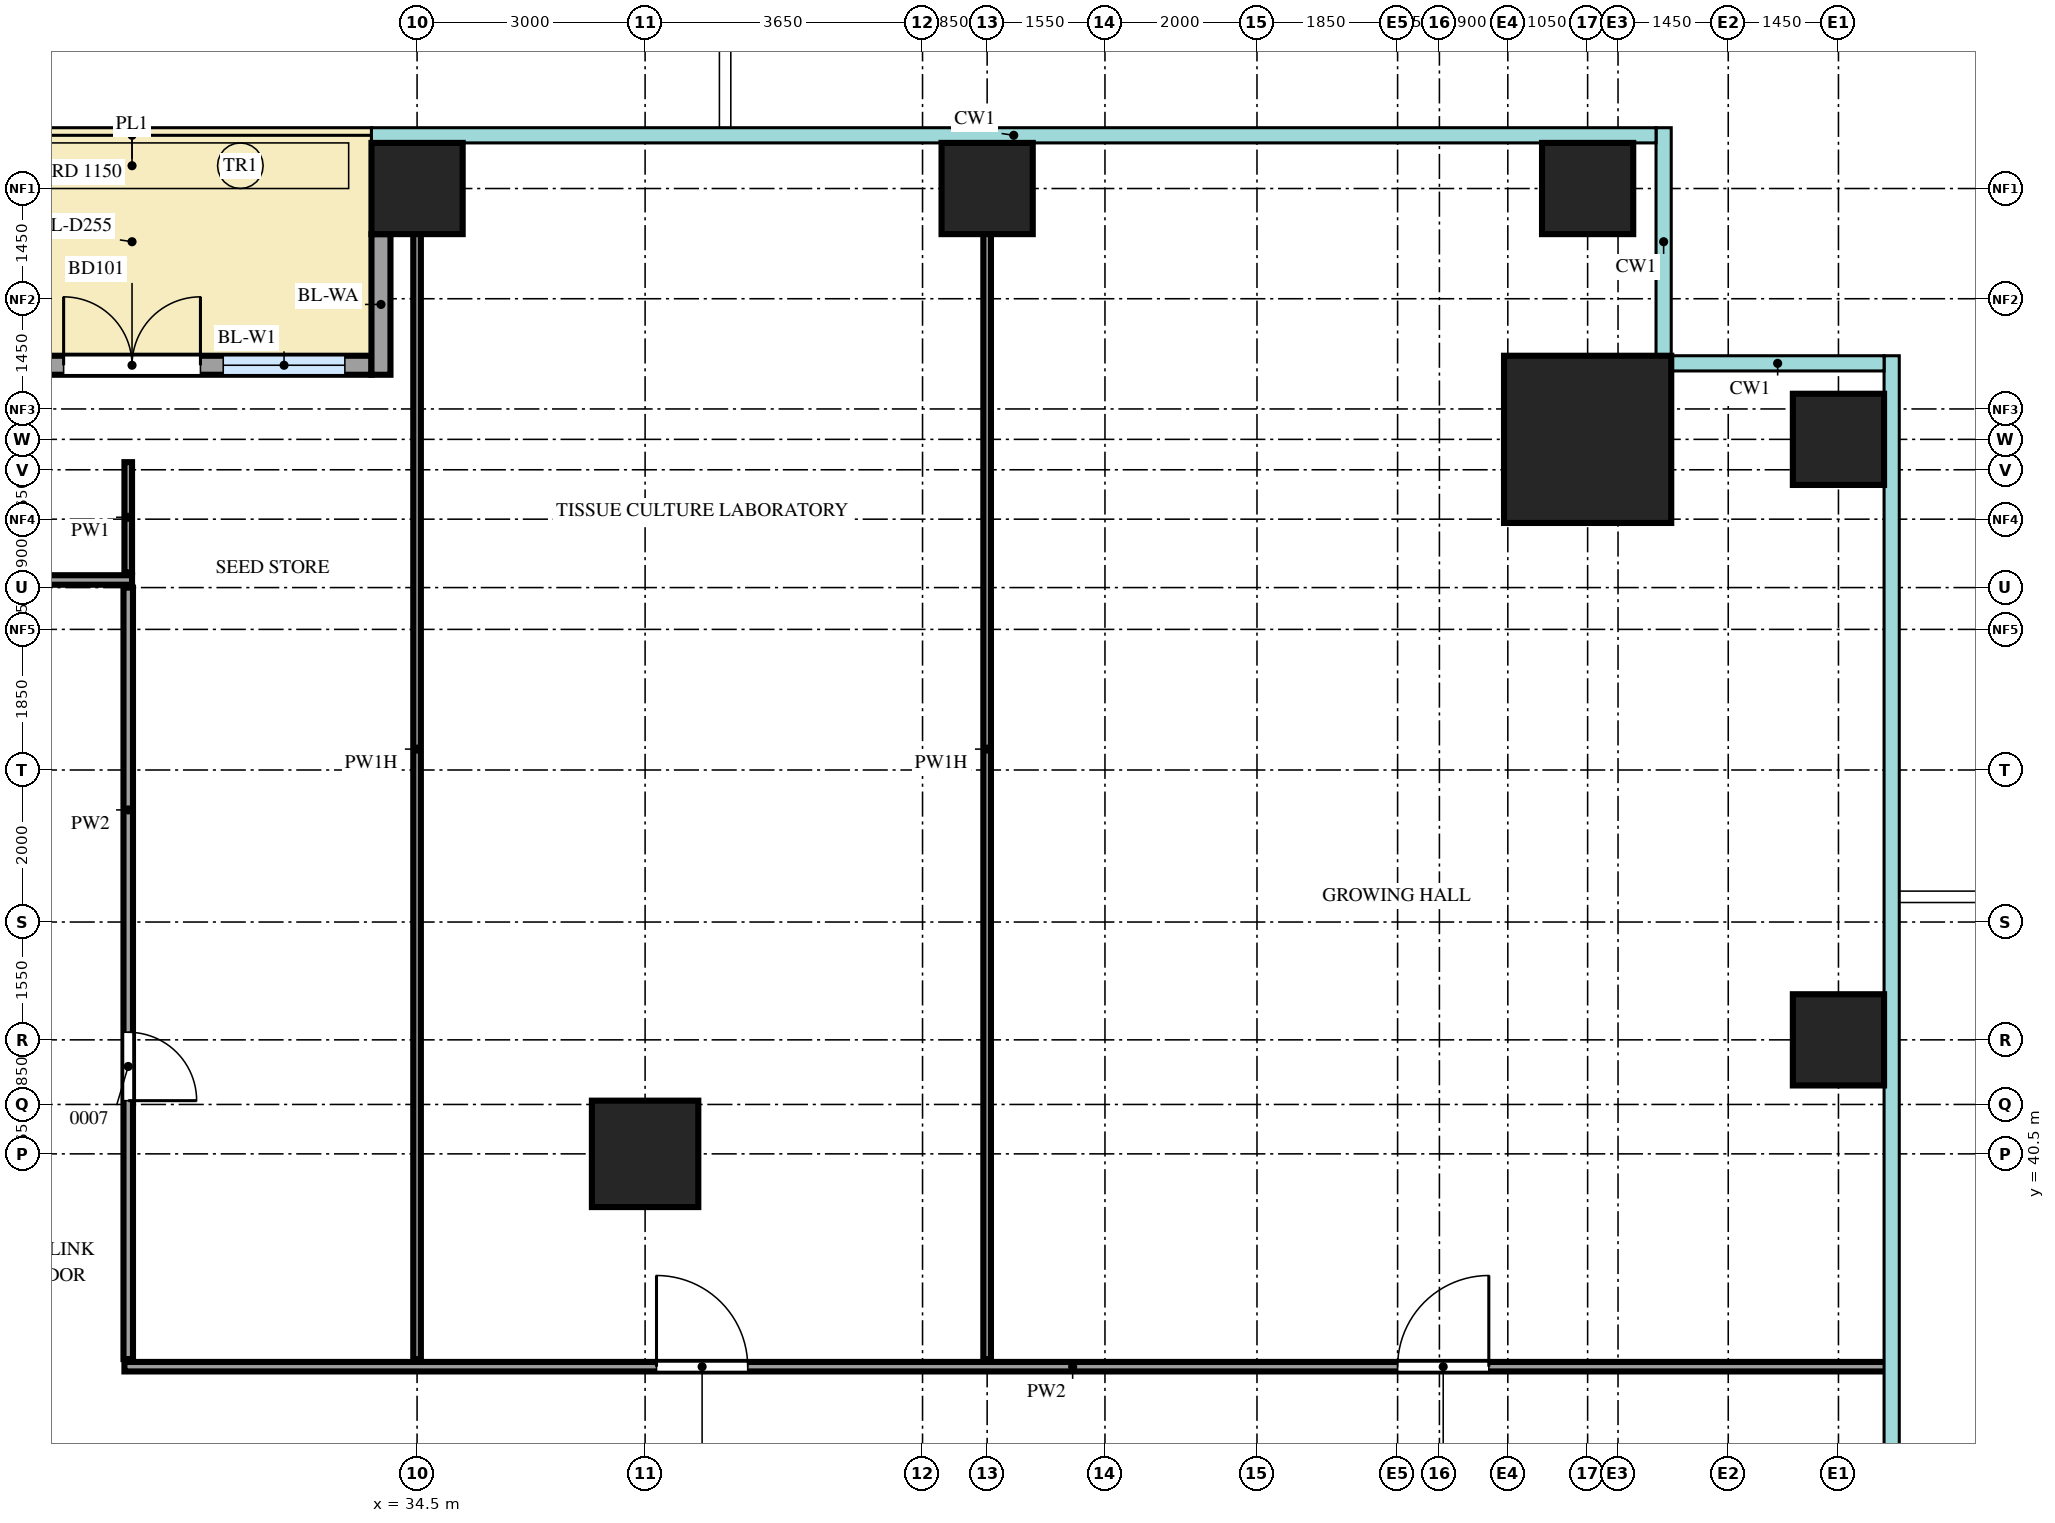
"""IFC4 building model, lengths in metres.
Left out: names, types, materials, properties, quantities, classifications, styles, units other than length and angle.
Written with IfcOpenShell. Run it as: python <this file> out.ifc"""

import sys

from ifc_helpers import new_model, si_unit, direction, frame, frame_2d, origin, origin_2d, place, context, subcontext, project, spatial, rectangle, extrude, source, transform, mapped, element, fill, save


model = new_model("IFC4")
c1 = context("Model", 3, precision=1e-05, world=origin(), true_north=direction((0.0, 1.0)))
c2 = subcontext(c1, "Body", "Model", "MODEL_VIEW")
j1 = project(units=[si_unit("LENGTHUNIT", "METRE"), si_unit("PLANEANGLEUNIT", "RADIAN")], contexts=[c1])
p1 = place(None, origin())
s1 = spatial("IfcSite", under=j1, at=p1, CompositionType="ELEMENT")
p2 = place(p1, origin())
s2 = spatial("IfcBuilding", under=s1, at=p2, CompositionType="ELEMENT")
p3 = place(p2, frame((0.0, 0.0, 51.0)))
s3 = spatial("IfcBuildingStorey", under=s2, at=p3, CompositionType="ELEMENT", Elevation=51.0)
m1 = source(origin(), c2, "Body", "SweptSolid", [
    extrude(rectangle(XDim=2.2, YDim=2.2, at=origin_2d()), origin(), (0.0, 0.0, 1.0), 4.5),
])
p4 = place(p3, frame((49.9, 49.9, 0.0), z_axis=(0.0, 0.0, 1.0), x_axis=(1.0, 0.0, 0.0)))
e1 = element("IfcColumn", 1, at=p4, inside=s3, PredefinedType="COLUMN", context=c2, shape_type="MappedRepresentation", body=[
    mapped(m1, transform((0.0, 0.0, 0.0))),
])
m2 = source(origin(), c2, "Body", "SweptSolid", [
    extrude(rectangle(XDim=1.2, YDim=1.2, at=origin_2d()), origin(), (0.0, 0.0, 1.0), 4.2),
])
for number, where, z_axis, x_axis in (
    (2, (53.2, 42.0, 0.0), (0.0, 0.0, 1.0), (1.0, 0.0, 0.0)),
    (3, (53.2, 49.9, 0.0), (0.0, 0.0, 1.0), (1.0, 0.0, 0.0)),
    (4, (34.5, 53.2, 0.0), (0.0, 0.0, 1.0), (1.0, 0.0, 0.0)),
    (5, (42.0, 53.2, 0.0), (0.0, 0.0, 1.0), (1.0, 0.0, 0.0)),
    (6, (49.9, 53.2, 0.0), (0.0, 0.0, 1.0), (1.0, 0.0, 0.0)),
):
    element("IfcColumn", number, at=place(p3, frame(where, z_axis=z_axis, x_axis=x_axis)), inside=s3, PredefinedType="COLUMN", context=c2, shape_type="MappedRepresentation", body=[
        mapped(m2, transform((0.0, 0.0, 0.0))),
    ])
m3 = source(origin(), c2, "Body", "SweptSolid", [
    extrude(rectangle(XDim=1.4, YDim=1.4, at=origin_2d()), origin(), (0.0, 0.0, 1.0), 4.2),
])
p5 = place(p3, frame((37.5, 40.5, 0.0), z_axis=(0.0, 0.0, 1.0), x_axis=(1.0, 0.0, 0.0)))
e7 = element("IfcColumn", 7, at=p5, inside=s3, PredefinedType="COLUMN", context=c2, shape_type="MappedRepresentation", body=[
    mapped(m3, transform((0.0, 0.0, 0.0))),
])
m4 = source(origin(), c2, "Body", "SweptSolid", [
    extrude(rectangle(XDim=6.3, YDim=0.25, at=frame_2d((3.15, 0.0))), origin(), (0.0, 0.0, 1.0), 4.2),
])
p6 = place(p3, frame((27.6, 50.875, 0.0), z_axis=(0.0, 0.0, 1.0), x_axis=(1.0, 0.0, 0.0)))
e8 = element("IfcWall", 8, at=p6, inside=s3, PredefinedType="SOLIDWALL", context=c2, shape_type="MappedRepresentation", body=[
    mapped(m4, transform((0.0, 0.0, 0.0))),
])
m5 = source(origin(), c2, "Body", "SweptSolid", [
    extrude(rectangle(XDim=1.6, YDim=2.4, at=frame_2d((0.8, 1.2))), frame((0.0, 0.135, 0.0), z_axis=(0.0, -1.0, 0.0), x_axis=(1.0, 0.0, 0.0)), (0.0, 0.0, 1.0), 0.27),
])
p7 = place(p6, frame((0.35, 0.0, 0.0)))
e9 = element("IfcOpeningElement", 9, at=p7, cuts=e8, PredefinedType="OPENING", context=c2, shape_type="MappedRepresentation", body=[
    mapped(m5, transform((0.0, 0.0, 0.0))),
])
p8 = place(p6, frame((4.35, 0.0, 0.0)))
e10 = element("IfcOpeningElement", 10, at=p8, cuts=e8, PredefinedType="OPENING", context=c2, shape_type="MappedRepresentation", body=[
    mapped(m5, transform((0.0, 0.0, 0.0))),
])
m6 = source(origin(), c2, "Body", "SweptSolid", [
    extrude(rectangle(XDim=1.8, YDim=2.4, at=frame_2d((0.9, 1.2))), frame((0.0, 0.135, 0.0), z_axis=(0.0, -1.0, 0.0), x_axis=(1.0, 0.0, 0.0)), (0.0, 0.0, 1.0), 0.27),
])
p9 = place(p6, frame((2.25, 0.0, 0.0)))
e11 = element("IfcOpeningElement", 11, at=p9, cuts=e8, PredefinedType="OPENING", context=c2, shape_type="MappedRepresentation", body=[
    mapped(m6, transform((0.0, 0.0, 0.0))),
])
m7 = source(origin(), c2, "Body", "SweptSolid", [
    extrude(rectangle(XDim=1.85, YDim=0.25, at=frame_2d((0.925, 0.0))), origin(), (0.0, 0.0, 1.0), 3.9),
])
p10 = place(p3, frame((34.025, 52.6, 0.0), z_axis=(0.0, 0.0, 1.0), x_axis=(0.0, -1.0, 0.0)))
e12 = element("IfcWall", 12, at=p10, inside=s3, PredefinedType="SOLIDWALL", context=c2, shape_type="MappedRepresentation", body=[
    mapped(m7, transform((0.0, 0.0, 0.0))),
])
m8 = source(origin(), c2, "Body", "SweptSolid", [
    extrude(rectangle(XDim=23.2, YDim=0.125, at=frame_2d((11.6, 0.0))), origin(), (0.0, 0.0, 1.0), 4.3),
])
p11 = place(p3, frame((30.65, 37.7, 0.0), z_axis=(0.0, 0.0, 1.0), x_axis=(1.0, 0.0, 0.0)))
e13 = element("IfcWall", 13, at=p11, inside=s3, PredefinedType="PARTITIONING", context=c2, shape_type="MappedRepresentation", body=[
    mapped(m8, transform((0.0, 0.0, 0.0))),
])
m9 = source(origin(), c2, "Body", "SweptSolid", [
    extrude(rectangle(XDim=1.2, YDim=2.1, at=frame_2d((0.6, 1.05))), frame((0.0, 0.073, 0.0), z_axis=(0.0, -1.0, 0.0), x_axis=(1.0, 0.0, 0.0)), (0.0, 0.0, 1.0), 0.145),
])
p12 = place(p11, frame((7.0, 0.0, 0.0)))
e14 = element("IfcOpeningElement", 14, at=p12, cuts=e13, PredefinedType="OPENING", context=c2, shape_type="MappedRepresentation", body=[
    mapped(m9, transform((0.0, 0.0, 0.0))),
])
p13 = place(p11, frame((16.75, 0.0, 0.0)))
e15 = element("IfcOpeningElement", 15, at=p13, cuts=e13, PredefinedType="OPENING", context=c2, shape_type="MappedRepresentation", body=[
    mapped(m9, transform((0.0, 0.0, 0.0))),
])
m10 = source(origin(), c2, "Body", "SweptSolid", [
    extrude(rectangle(XDim=10.15, YDim=0.125, at=frame_2d((5.075, 0.0))), origin(), (0.0, 0.0, 1.0), 4.3),
])
p14 = place(p3, frame((30.7, 37.8, 0.0), z_axis=(0.0, 0.0, 1.0), x_axis=(0.0, 1.0, 0.0)))
e16 = element("IfcWall", 16, at=p14, inside=s3, PredefinedType="PARTITIONING", context=c2, shape_type="MappedRepresentation", body=[
    mapped(m10, transform((0.0, 0.0, 0.0))),
])
m11 = source(origin(), c2, "Body", "SweptSolid", [
    extrude(rectangle(XDim=0.9, YDim=2.1, at=frame_2d((0.45, 1.05))), frame((0.0, 0.073, 0.0), z_axis=(0.0, -1.0, 0.0), x_axis=(1.0, 0.0, 0.0)), (0.0, 0.0, 1.0), 0.145),
])
p15 = place(p14, frame((3.4, 0.0, 0.0)))
e17 = element("IfcOpeningElement", 17, at=p15, cuts=e16, PredefinedType="OPENING", context=c2, shape_type="MappedRepresentation", body=[
    mapped(m11, transform((0.0, 0.0, 0.0))),
])
m12 = source(origin(), c2, "Body", "SweptSolid", [
    extrude(rectangle(XDim=16.05, YDim=0.1, at=frame_2d((8.025, 0.0))), origin(), (0.0, 0.0, 1.0), 3.7),
])
for number, where, z_axis, x_axis in (
    (18, (34.5, 37.8, 0.0), (0.0, 0.0, 1.0), (0.0, 1.0, 0.0)),
    (19, (42.0, 37.8, 0.0), (0.0, 0.0, 1.0), (0.0, 1.0, 0.0)),
):
    element("IfcWall", number, at=place(p3, frame(where, z_axis=z_axis, x_axis=x_axis)), inside=s3, PredefinedType="PARTITIONING", context=c2, shape_type="MappedRepresentation", body=[
        mapped(m12, transform((0.0, 0.0, 0.0))),
    ])
m13 = source(origin(), c2, "Body", "SweptSolid", [
    extrude(rectangle(XDim=26.6, YDim=0.125, at=frame_2d((13.3, 0.0))), origin(), (0.0, 0.0, 1.0), 4.3),
])
p16 = place(p3, frame((4.15, 48.05, 0.0), z_axis=(0.0, 0.0, 1.0), x_axis=(1.0, 0.0, 0.0)))
e20 = element("IfcWall", 20, at=p16, inside=s3, PredefinedType="PARTITIONING", context=c2, shape_type="MappedRepresentation", body=[
    mapped(m13, transform((0.0, 0.0, 0.0))),
])
p17 = place(p16, frame((3.5, 0.0, 0.0)))
e21 = element("IfcOpeningElement", 21, at=p17, cuts=e20, PredefinedType="OPENING", context=c2, shape_type="MappedRepresentation", body=[
    mapped(m11, transform((0.0, 0.0, 0.0))),
])
p18 = place(p16, frame((16.6, 0.0, 0.0)))
e22 = element("IfcOpeningElement", 22, at=p18, cuts=e20, PredefinedType="OPENING", context=c2, shape_type="MappedRepresentation", body=[
    mapped(m9, transform((0.0, 0.0, 0.0))),
])
m14 = source(origin(), c2, "Body", "SweptSolid", [
    extrude(rectangle(XDim=1.45, YDim=0.1, at=frame_2d((0.725, 0.0))), origin(), (0.0, 0.0, 1.0), 4.3),
])
p19 = place(p3, frame((30.7, 48.15, 0.0), z_axis=(0.0, 0.0, 1.0), x_axis=(0.0, 1.0, 0.0)))
e23 = element("IfcWall", 23, at=p19, inside=s3, PredefinedType="PARTITIONING", context=c2, shape_type="MappedRepresentation", body=[
    mapped(m14, transform((0.0, 0.0, 0.0))),
])
m15 = source(origin(), c2, "Body", "SweptSolid", [
    extrude(rectangle(XDim=1.6, YDim=2.4, at=frame_2d((0.8, 1.2))), frame((0.0, 0.03, 0.0), z_axis=(0.0, -1.0, 0.0), x_axis=(1.0, 0.0, 0.0)), (0.0, 0.0, 1.0), 0.06),
])
p20 = place(p8, origin())
e24 = element("IfcWindow", 24, at=p20, inside=s3, PartitioningType="SINGLE_PANEL", PredefinedType="WINDOW", context=c2, shape_type="MappedRepresentation", body=[
    mapped(m15, transform((0.0, 0.0, 0.0))),
])
fill(e10, e24)
m16 = source(origin(), c2, "Body", "SweptSolid", [
    extrude(rectangle(XDim=1.8, YDim=2.4, at=frame_2d((0.9, 1.2))), frame((0.0, 0.025, 0.0), z_axis=(0.0, -1.0, 0.0), x_axis=(1.0, 0.0, 0.0)), (0.0, 0.0, 1.0), 0.05),
])
p21 = place(p9, origin())
e25 = element("IfcDoor", 25, at=p21, inside=s3, OperationType="DOUBLE_DOOR_DOUBLE_SWING", PredefinedType="DOOR", context=c2, shape_type="MappedRepresentation", body=[
    mapped(m16, transform((0.0, 0.0, 0.0))),
])
fill(e11, e25)
m17 = source(origin(), c2, "Body", "SweptSolid", [
    extrude(rectangle(XDim=0.9, YDim=2.1, at=frame_2d((0.45, 1.05))), frame((0.0, 0.025, 0.0), z_axis=(0.0, -1.0, 0.0), x_axis=(1.0, 0.0, 0.0)), (0.0, 0.0, 1.0), 0.05),
])
p22 = place(p15, origin())
e26 = element("IfcDoor", 26, at=p22, inside=s3, OperationType="SINGLE_SWING_LEFT", PredefinedType="DOOR", context=c2, shape_type="MappedRepresentation", body=[
    mapped(m17, transform((0.0, 0.0, 0.0))),
])
fill(e17, e26)
m18 = source(origin(), c2, "Body", "SweptSolid", [
    extrude(rectangle(XDim=1.2, YDim=2.1, at=frame_2d((0.6, 1.05))), frame((0.0, 0.025, 0.0), z_axis=(0.0, -1.0, 0.0), x_axis=(1.0, 0.0, 0.0)), (0.0, 0.0, 1.0), 0.05),
])
p23 = place(p12, origin())
e27 = element("IfcDoor", 27, at=p23, inside=s3, OperationType="SINGLE_SWING_RIGHT", PredefinedType="DOOR", context=c2, shape_type="MappedRepresentation", body=[
    mapped(m18, transform((0.0, 0.0, 0.0))),
])
fill(e14, e27)
p24 = place(p13, origin())
e28 = element("IfcDoor", 28, at=p24, inside=s3, OperationType="SINGLE_SWING_LEFT", PredefinedType="DOOR", context=c2, shape_type="MappedRepresentation", body=[
    mapped(m18, transform((0.0, 0.0, 0.0))),
])
fill(e15, e28)
save(model, sys.argv[1])
